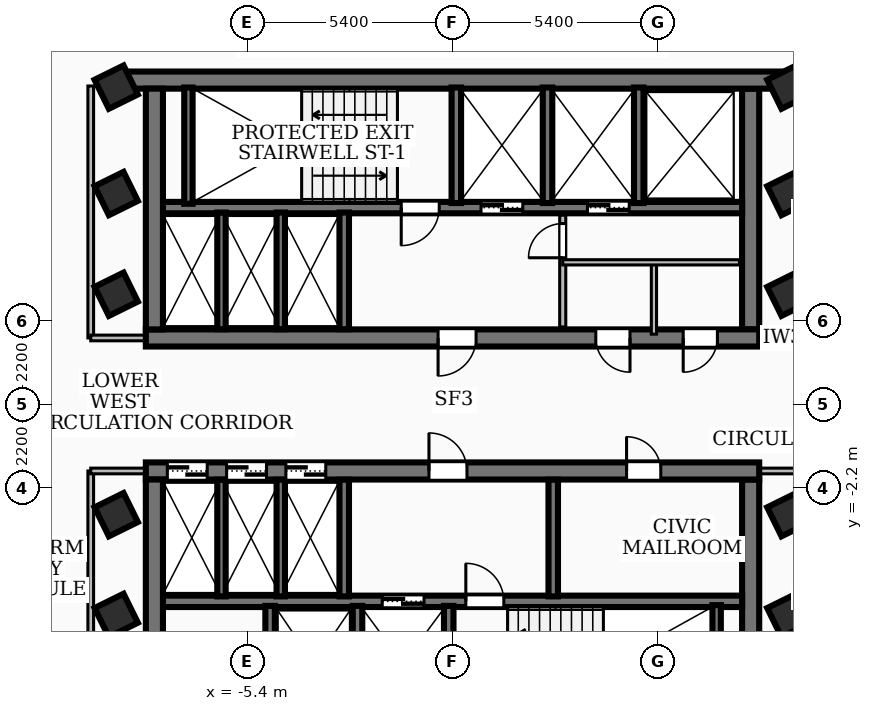
"""IFC4 building model, lengths in metres.
Left out: names, types, materials, properties, quantities, classifications, styles, units other than length and angle.
Written with IfcOpenShell. Run it as: python <this file> out.ifc"""

import sys

from ifc_helpers import new_model, si_unit, direction, frame, frame_2d, origin, origin_2d, place, context, subcontext, project, spatial, rectangle, extrude, element, fill, save


model = new_model("IFC4")
c1 = context("Model", 3, precision=1e-05, world=origin(), true_north=direction((0.0, 1.0)))
c2 = subcontext(c1, "Body", "Model", "MODEL_VIEW")
j1 = project(units=[si_unit("LENGTHUNIT", "METRE"), si_unit("PLANEANGLEUNIT", "RADIAN")], contexts=[c1])
p1 = place(None, origin())
s1 = spatial("IfcSite", under=j1, at=p1, CompositionType="ELEMENT")
p2 = place(p1, origin())
s2 = spatial("IfcBuilding", under=s1, at=p2, CompositionType="ELEMENT")
p3 = place(p2, frame((0.0, 0.0, 192.6)))
s3 = spatial("IfcBuildingStorey", under=s2, at=p3, CompositionType="ELEMENT", Elevation=192.6)
p4 = place(p3, frame((-8.78, 8.535, 0.0), z_axis=(0.0, 0.0, 1.0), x_axis=(1.0, 0.0, 0.0)))
e1 = element("IfcWall", 1, at=p4, inside=s3, PredefinedType="SHEAR", context=c2, shape_type="SweptSolid", body=[
    extrude(rectangle(XDim=17.56, YDim=0.45, at=frame_2d((8.78, 0.0))), origin(), (0.0, 0.0, 1.0), 3.2),
])
p5 = place(p3, frame((8.07, 1.75, 0.0), z_axis=(0.0, 0.0, 1.0), x_axis=(-1.0, 0.0, 0.0)))
e2 = element("IfcWall", 2, at=p5, inside=s3, PredefinedType="SHEAR", context=c2, shape_type="SweptSolid", body=[
    extrude(rectangle(XDim=16.14, YDim=0.45, at=frame_2d((8.07, 0.0))), origin(), (0.0, 0.0, 1.0), 3.2),
])
p6 = place(p5, frame((7.45, 0.0, 0.0)))
e3 = element("IfcOpeningElement", 3, at=p6, cuts=e2, PredefinedType="OPENING", context=c2, shape_type="SweptSolid", body=[
    extrude(rectangle(XDim=1.0, YDim=2.1, at=frame_2d((0.5, 1.05))), frame((0.0, 0.235, 0.0), z_axis=(0.0, -1.0, 0.0), x_axis=(1.0, 0.0, 0.0)), (0.0, 0.0, 1.0), 0.47),
])
p7 = place(p5, frame((3.4, 0.0, 0.0)))
e4 = element("IfcOpeningElement", 4, at=p7, cuts=e2, PredefinedType="OPENING", context=c2, shape_type="SweptSolid", body=[
    extrude(rectangle(XDim=0.9, YDim=2.06, at=frame_2d((0.45, 1.03))), frame((0.0, 0.235, 0.0), z_axis=(0.0, -1.0, 0.0), x_axis=(1.0, 0.0, 0.0)), (0.0, 0.0, 1.0), 0.47),
])
p8 = place(p5, frame((1.1, 0.0, 0.0)))
e5 = element("IfcOpeningElement", 5, at=p8, cuts=e2, PredefinedType="OPENING", context=c2, shape_type="SweptSolid", body=[
    extrude(rectangle(XDim=0.9, YDim=2.06, at=frame_2d((0.45, 1.03))), frame((0.0, 0.235, 0.0), z_axis=(0.0, -1.0, 0.0), x_axis=(1.0, 0.0, 0.0)), (0.0, 0.0, 1.0), 0.47),
])
for number, where, z_axis, x_axis in (
    (6, (-7.845, 1.975, 0.0), (0.0, 0.0, 1.0), (0.0, 1.0, 0.0)),
    (7, (7.845, 8.31, 0.0), (0.0, 0.0, 1.0), (0.0, -1.0, 0.0)),
):
    element("IfcWall", number, at=place(p3, frame(where, z_axis=z_axis, x_axis=x_axis)), inside=s3, PredefinedType="SHEAR", context=c2, shape_type="SweptSolid", body=[
        extrude(rectangle(XDim=6.335, YDim=0.45, at=frame_2d((3.167, 0.0))), origin(), (0.0, 0.0, 1.0), 3.2),
    ])
p9 = place(p3, frame((7.62, 5.18, 0.0), z_axis=(0.0, 0.0, 1.0), x_axis=(-1.0, 0.0, 0.0)))
e8 = element("IfcWall", 8, at=p9, inside=s3, PredefinedType="SOLIDWALL", context=c2, shape_type="SweptSolid", body=[
    extrude(rectangle(XDim=15.24, YDim=0.3, at=frame_2d((7.62, 0.0))), origin(), (0.0, 0.0, 1.0), 3.2),
])
p10 = place(p9, frame((5.77, 0.0, 0.0)))
e9 = element("IfcOpeningElement", 9, at=p10, cuts=e8, PredefinedType="OPENING", context=c2, shape_type="SweptSolid", body=[
    extrude(rectangle(XDim=1.1, YDim=2.15, at=frame_2d((0.55, 1.075))), frame((0.0, 0.16, 0.0), z_axis=(0.0, -1.0, 0.0), x_axis=(1.0, 0.0, 0.0)), (0.0, 0.0, 1.0), 0.32),
])
p11 = place(p9, frame((2.97, 0.0, 0.0)))
e10 = element("IfcOpeningElement", 10, at=p11, cuts=e8, PredefinedType="OPENING", context=c2, shape_type="SweptSolid", body=[
    extrude(rectangle(XDim=1.1, YDim=2.15, at=frame_2d((0.55, 1.075))), frame((0.0, 0.16, 0.0), z_axis=(0.0, -1.0, 0.0), x_axis=(1.0, 0.0, 0.0)), (0.0, 0.0, 1.0), 0.32),
])
p12 = place(p9, frame((7.97, 0.0, 0.0)))
e11 = element("IfcOpeningElement", 11, at=p12, cuts=e8, PredefinedType="OPENING", context=c2, shape_type="SweptSolid", body=[
    extrude(rectangle(XDim=1.0, YDim=2.1, at=frame_2d((0.5, 1.05))), frame((0.0, 0.16, 0.0), z_axis=(0.0, -1.0, 0.0), x_axis=(1.0, 0.0, 0.0)), (0.0, 0.0, 1.0), 0.32),
])
p13 = place(p3, frame((-8.07, -1.75, 0.0), z_axis=(0.0, 0.0, 1.0), x_axis=(1.0, 0.0, 0.0)))
e12 = element("IfcWall", 12, at=p13, inside=s3, PredefinedType="SHEAR", context=c2, shape_type="SweptSolid", body=[
    extrude(rectangle(XDim=16.14, YDim=0.45, at=frame_2d((8.07, 0.0))), origin(), (0.0, 0.0, 1.0), 3.2),
])
p14 = place(p13, frame((7.45, 0.0, 0.0)))
e13 = element("IfcOpeningElement", 13, at=p14, cuts=e12, PredefinedType="OPENING", context=c2, shape_type="SweptSolid", body=[
    extrude(rectangle(XDim=1.0, YDim=2.1, at=frame_2d((0.5, 1.05))), frame((0.0, 0.235, 0.0), z_axis=(0.0, -1.0, 0.0), x_axis=(1.0, 0.0, 0.0)), (0.0, 0.0, 1.0), 0.47),
])
p15 = place(p13, frame((12.65, 0.0, 0.0)))
e14 = element("IfcOpeningElement", 14, at=p15, cuts=e12, PredefinedType="OPENING", context=c2, shape_type="SweptSolid", body=[
    extrude(rectangle(XDim=0.9, YDim=2.06, at=frame_2d((0.45, 1.03))), frame((0.0, 0.235, 0.0), z_axis=(0.0, -1.0, 0.0), x_axis=(1.0, 0.0, 0.0)), (0.0, 0.0, 1.0), 0.47),
])
p16 = place(p13, frame((0.565, 0.0, 0.0)))
e15 = element("IfcOpeningElement", 15, at=p16, cuts=e12, PredefinedType="OPENING", context=c2, shape_type="SweptSolid", body=[
    extrude(rectangle(XDim=1.05, YDim=2.15, at=frame_2d((0.525, 1.075))), frame((0.0, 0.235, 0.0), z_axis=(0.0, -1.0, 0.0), x_axis=(1.0, 0.0, 0.0)), (0.0, 0.0, 1.0), 0.47),
])
p17 = place(p13, frame((2.125, 0.0, 0.0)))
e16 = element("IfcOpeningElement", 16, at=p17, cuts=e12, PredefinedType="OPENING", context=c2, shape_type="SweptSolid", body=[
    extrude(rectangle(XDim=1.05, YDim=2.15, at=frame_2d((0.525, 1.075))), frame((0.0, 0.235, 0.0), z_axis=(0.0, -1.0, 0.0), x_axis=(1.0, 0.0, 0.0)), (0.0, 0.0, 1.0), 0.47),
])
p18 = place(p13, frame((3.685, 0.0, 0.0)))
e17 = element("IfcOpeningElement", 17, at=p18, cuts=e12, PredefinedType="OPENING", context=c2, shape_type="SweptSolid", body=[
    extrude(rectangle(XDim=1.05, YDim=2.15, at=frame_2d((0.525, 1.075))), frame((0.0, 0.235, 0.0), z_axis=(0.0, -1.0, 0.0), x_axis=(1.0, 0.0, 0.0)), (0.0, 0.0, 1.0), 0.47),
])
for number, where, z_axis, x_axis in (
    (18, (-7.845, -8.31, 0.0), (0.0, 0.0, 1.0), (0.0, 1.0, 0.0)),
    (19, (7.845, -1.975, 0.0), (0.0, 0.0, 1.0), (0.0, -1.0, 0.0)),
):
    element("IfcWall", number, at=place(p3, frame(where, z_axis=z_axis, x_axis=x_axis)), inside=s3, PredefinedType="SHEAR", context=c2, shape_type="SweptSolid", body=[
        extrude(rectangle(XDim=6.335, YDim=0.45, at=frame_2d((3.167, 0.0))), origin(), (0.0, 0.0, 1.0), 3.2),
    ])
p19 = place(p3, frame((-7.62, -5.18, 0.0), z_axis=(0.0, 0.0, 1.0), x_axis=(1.0, 0.0, 0.0)))
e20 = element("IfcWall", 20, at=p19, inside=s3, PredefinedType="SOLIDWALL", context=c2, shape_type="SweptSolid", body=[
    extrude(rectangle(XDim=15.24, YDim=0.3, at=frame_2d((7.62, 0.0))), origin(), (0.0, 0.0, 1.0), 3.2),
])
p20 = place(p19, frame((5.77, 0.0, 0.0)))
e21 = element("IfcOpeningElement", 21, at=p20, cuts=e20, PredefinedType="OPENING", context=c2, shape_type="SweptSolid", body=[
    extrude(rectangle(XDim=1.1, YDim=2.15, at=frame_2d((0.55, 1.075))), frame((0.0, 0.16, 0.0), z_axis=(0.0, -1.0, 0.0), x_axis=(1.0, 0.0, 0.0)), (0.0, 0.0, 1.0), 0.32),
])
p21 = place(p19, frame((7.97, 0.0, 0.0)))
e22 = element("IfcOpeningElement", 22, at=p21, cuts=e20, PredefinedType="OPENING", context=c2, shape_type="SweptSolid", body=[
    extrude(rectangle(XDim=1.0, YDim=2.1, at=frame_2d((0.5, 1.05))), frame((0.0, 0.16, 0.0), z_axis=(0.0, -1.0, 0.0), x_axis=(1.0, 0.0, 0.0)), (0.0, 0.0, 1.0), 0.32),
])
for number, where, z_axis, x_axis in (
    (23, (-6.95, 5.28, 0.0), (0.0, 0.0, 1.0), (0.0, 1.0, 0.0)),
    (24, (6.95, -8.34, 0.0), (0.0, 0.0, 1.0), (0.0, 1.0, 0.0)),
):
    element("IfcWall", number, at=place(p3, frame(where, z_axis=z_axis, x_axis=x_axis)), inside=s3, PredefinedType="SOLIDWALL", context=c2, shape_type="SweptSolid", body=[
        extrude(rectangle(XDim=3.06, YDim=0.22, at=frame_2d((1.53, 0.0))), origin(), (0.0, 0.0, 1.0), 3.2),
    ])
for number, where, z_axis, x_axis in (
    (25, (0.1, 5.3, 0.0), (0.0, 0.0, 1.0), (0.0, 1.0, 0.0)),
    (26, (2.5, 5.3, 0.0), (0.0, 0.0, 1.0), (0.0, 1.0, 0.0)),
    (27, (4.9, 5.3, 0.0), (0.0, 0.0, 1.0), (0.0, 1.0, 0.0)),
):
    element("IfcWall", number, at=place(p3, frame(where, z_axis=z_axis, x_axis=x_axis)), inside=s3, PredefinedType="SOLIDWALL", context=c2, shape_type="SweptSolid", body=[
        extrude(rectangle(XDim=3.04, YDim=0.25, at=frame_2d((1.52, 0.0))), origin(), (0.0, 0.0, 1.0), 3.2),
    ])
p22 = place(p3, frame((-2.85, 1.98, 0.0), z_axis=(0.0, 0.0, 1.0), x_axis=(0.0, 1.0, 0.0)))
e28 = element("IfcWall", 28, at=p22, inside=s3, PredefinedType="SOLIDWALL", context=c2, shape_type="SweptSolid", body=[
    extrude(rectangle(XDim=3.07, YDim=0.25, at=frame_2d((1.535, 0.0))), origin(), (0.0, 0.0, 1.0), 3.2),
])
for number, where, z_axis, x_axis in (
    (29, (-0.1, -8.34, 0.0), (0.0, 0.0, 1.0), (0.0, 1.0, 0.0)),
    (30, (-2.5, -8.34, 0.0), (0.0, 0.0, 1.0), (0.0, 1.0, 0.0)),
    (31, (-4.8, -8.34, 0.0), (0.0, 0.0, 1.0), (0.0, 1.0, 0.0)),
):
    element("IfcWall", number, at=place(p3, frame(where, z_axis=z_axis, x_axis=x_axis)), inside=s3, PredefinedType="SOLIDWALL", context=c2, shape_type="SweptSolid", body=[
        extrude(rectangle(XDim=3.04, YDim=0.25, at=frame_2d((1.52, 0.0))), origin(), (0.0, 0.0, 1.0), 3.2),
    ])
for number, where, z_axis, x_axis in (
    (32, (-2.85, -5.05, 0.0), (0.0, 0.0, 1.0), (0.0, 1.0, 0.0)),
    (33, (2.65, -5.05, 0.0), (0.0, 0.0, 1.0), (0.0, 1.0, 0.0)),
):
    element("IfcWall", number, at=place(p3, frame(where, z_axis=z_axis, x_axis=x_axis)), inside=s3, PredefinedType="SOLIDWALL", context=c2, shape_type="SweptSolid", body=[
        extrude(rectangle(XDim=3.07, YDim=0.25, at=frame_2d((1.535, 0.0))), origin(), (0.0, 0.0, 1.0), 3.2),
    ])
for number, where, z_axis, x_axis in (
    (34, (-6.08, 1.98, 0.0), (0.0, 0.0, 1.0), (0.0, 1.0, 0.0)),
    (35, (-4.52, 1.98, 0.0), (0.0, 0.0, 1.0), (0.0, 1.0, 0.0)),
    (36, (-6.08, -5.05, 0.0), (0.0, 0.0, 1.0), (0.0, 1.0, 0.0)),
    (37, (-4.52, -5.05, 0.0), (0.0, 0.0, 1.0), (0.0, 1.0, 0.0)),
):
    element("IfcWall", number, at=place(p3, frame(where, z_axis=z_axis, x_axis=x_axis)), inside=s3, PredefinedType="SOLIDWALL", context=c2, shape_type="SweptSolid", body=[
        extrude(rectangle(XDim=3.07, YDim=0.22, at=frame_2d((1.535, 0.0))), origin(), (0.0, 0.0, 1.0), 3.2),
    ])
for number, where, z_axis, x_axis in (
    (38, (-8.85, -5.55, 0.0), (0.0, 0.0, 1.0), (0.897, 0.442, 0.0)),
    (39, (-8.85, -2.9, 0.0), (0.0, 0.0, 1.0), (0.897, 0.442, 0.0)),
    (40, (-8.85, 2.9, 0.0), (0.0, 0.0, 1.0), (0.897, 0.442, 0.0)),
    (41, (-8.85, 5.55, 0.0), (0.0, 0.0, 1.0), (0.897, 0.442, 0.0)),
    (42, (8.85, -5.55, 0.0), (0.0, 0.0, 1.0), (0.897, 0.442, 0.0)),
    (43, (8.85, -2.9, 0.0), (0.0, 0.0, 1.0), (0.897, 0.442, 0.0)),
    (44, (8.85, 2.9, 0.0), (0.0, 0.0, 1.0), (0.897, 0.442, 0.0)),
    (45, (8.85, 5.55, 0.0), (0.0, 0.0, 1.0), (0.897, 0.442, 0.0)),
    (46, (-8.85, 8.35, 0.0), (0.0, 0.0, 1.0), (0.897, 0.442, 0.0)),
    (47, (8.85, 8.35, 0.0), (0.0, 0.0, 1.0), (0.897, 0.442, 0.0)),
):
    element("IfcColumn", number, at=place(p3, frame(where, z_axis=z_axis, x_axis=x_axis)), inside=s3, PredefinedType="COLUMN", context=c2, shape_type="SweptSolid", body=[
        extrude(rectangle(XDim=0.85, YDim=0.85, at=origin_2d()), origin(), (0.0, 0.0, 1.0), 3.6),
    ])
p23 = place(p3, frame((2.9, 2.04, 0.0), z_axis=(0.0, 0.0, 1.0), x_axis=(0.0, 1.0, 0.0)))
e48 = element("IfcWall", 48, at=p23, inside=s3, PredefinedType="PARTITIONING", context=c2, shape_type="SweptSolid", body=[
    extrude(rectangle(XDim=2.94, YDim=0.16, at=frame_2d((1.47, 0.0))), origin(), (0.0, 0.0, 1.0), 2.43),
])
p24 = place(p23, frame((1.82, 0.0, 0.0)))
e49 = element("IfcOpeningElement", 49, at=p24, cuts=e48, PredefinedType="OPENING", context=c2, shape_type="SweptSolid", body=[
    extrude(rectangle(XDim=0.9, YDim=2.06, at=frame_2d((0.45, 1.03))), frame((0.0, 0.09, 0.0), z_axis=(0.0, -1.0, 0.0), x_axis=(1.0, 0.0, 0.0)), (0.0, 0.0, 1.0), 0.18),
])
p25 = place(p3, frame((2.9, 3.74, 0.0), z_axis=(0.0, 0.0, 1.0), x_axis=(1.0, 0.0, 0.0)))
e50 = element("IfcWall", 50, at=p25, inside=s3, PredefinedType="PARTITIONING", context=c2, shape_type="SweptSolid", body=[
    extrude(rectangle(XDim=4.65, YDim=0.138, at=frame_2d((2.325, 0.0))), origin(), (0.0, 0.0, 1.0), 3.2),
])
p26 = place(p3, frame((5.3, 1.85, 0.0), z_axis=(0.0, 0.0, 1.0), x_axis=(0.0, 1.0, 0.0)))
e51 = element("IfcWall", 51, at=p26, inside=s3, PredefinedType="PARTITIONING", context=c2, shape_type="SweptSolid", body=[
    extrude(rectangle(XDim=1.89, YDim=0.138, at=frame_2d((0.945, 0.0))), origin(), (0.0, 0.0, 1.0), 2.43),
])
p27 = place(p3, frame((-9.52, 1.75, 0.0), z_axis=(0.0, 0.0, 1.0), x_axis=(0.0, 1.0, 0.0)))
e52 = element("IfcWall", 52, at=p27, inside=s3, PredefinedType="PARTITIONING", context=c2, shape_type="SweptSolid", body=[
    extrude(rectangle(XDim=6.63, YDim=0.15, at=frame_2d((3.315, 0.0))), origin(), (0.0, 0.0, 1.0), 3.2),
])
p28 = place(p3, frame((-7.85, 1.75, 0.0), z_axis=(0.0, 0.0, 1.0), x_axis=(-1.0, 0.0, 0.0)))
e53 = element("IfcWall", 53, at=p28, inside=s3, PredefinedType="PARTITIONING", context=c2, shape_type="SweptSolid", body=[
    extrude(rectangle(XDim=1.67, YDim=0.15, at=frame_2d((0.835, 0.0))), origin(), (0.0, 0.0, 1.0), 2.43),
])
p29 = place(p3, frame((-9.52, -8.38, 0.0), z_axis=(0.0, 0.0, 1.0), x_axis=(0.0, 1.0, 0.0)))
e54 = element("IfcWall", 54, at=p29, inside=s3, PredefinedType="PARTITIONING", context=c2, shape_type="SweptSolid", body=[
    extrude(rectangle(XDim=6.63, YDim=0.15, at=frame_2d((3.315, 0.0))), origin(), (0.0, 0.0, 1.0), 2.504),
])
for number, where, z_axis, x_axis in (
    (55, (-7.85, -1.75, 0.0), (0.0, 0.0, 1.0), (-1.0, 0.0, 0.0)),
    (56, (7.85, 1.75, 0.0), (0.0, 0.0, 1.0), (1.0, 0.0, 0.0)),
    (57, (7.85, -1.75, 0.0), (0.0, 0.0, 1.0), (1.0, 0.0, 0.0)),
):
    element("IfcWall", number, at=place(p3, frame(where, z_axis=z_axis, x_axis=x_axis)), inside=s3, PredefinedType="PARTITIONING", context=c2, shape_type="SweptSolid", body=[
        extrude(rectangle(XDim=1.67, YDim=0.15, at=frame_2d((0.835, 0.0))), origin(), (0.0, 0.0, 1.0), 2.43),
    ])
p30 = place(p3, frame((8.122, 15.843, 0.0), z_axis=(0.0, 0.0, 1.0), x_axis=(0.442129285211, -0.896951333774, 0.0)))
e58 = element("IfcWall", 58, at=p30, inside=s3, PredefinedType="PARTITIONING", context=c2, shape_type="SweptSolid", body=[
    extrude(rectangle(XDim=20.639, YDim=0.11, at=frame_2d((10.319, 0.0))), origin(), (0.0, 0.0, 1.0), 2.504),
])
p31 = place(p30, frame((10.02, 0.0, 0.0)))
e59 = element("IfcOpeningElement", 59, at=p31, cuts=e58, PredefinedType="OPENING", context=c2, shape_type="SweptSolid", body=[
    extrude(rectangle(XDim=1.2, YDim=2.1, at=frame_2d((0.6, 1.05))), frame((0.0, 0.065, 0.0), z_axis=(0.0, -1.0, 0.0), x_axis=(1.0, 0.0, 0.0)), (0.0, 0.0, 1.0), 0.13),
])
p32 = place(p3, frame((-15.843, 8.122, 0.0), z_axis=(0.0, 0.0, 1.0), x_axis=(0.896951333774, 0.442129285211, 0.0)))
e60 = element("IfcWall", 60, at=p32, inside=s3, PredefinedType="PARTITIONING", context=c2, shape_type="SweptSolid", body=[
    extrude(rectangle(XDim=20.639, YDim=0.11, at=frame_2d((10.319, 0.0))), origin(), (0.0, 0.0, 1.0), 2.504),
])
p33 = place(p32, frame((10.02, 0.0, 0.0)))
e61 = element("IfcOpeningElement", 61, at=p33, cuts=e60, PredefinedType="OPENING", context=c2, shape_type="SweptSolid", body=[
    extrude(rectangle(XDim=1.2, YDim=2.1, at=frame_2d((0.6, 1.05))), frame((0.0, 0.065, 0.0), z_axis=(0.0, -1.0, 0.0), x_axis=(1.0, 0.0, 0.0)), (0.0, 0.0, 1.0), 0.13),
])
p34 = place(p3, frame((-8.122, -15.843, 0.0), z_axis=(0.0, 0.0, 1.0), x_axis=(-0.442129285211, 0.896951333774, 0.0)))
e62 = element("IfcWall", 62, at=p34, inside=s3, PredefinedType="PARTITIONING", context=c2, shape_type="SweptSolid", body=[
    extrude(rectangle(XDim=20.639, YDim=0.11, at=frame_2d((10.319, 0.0))), origin(), (0.0, 0.0, 1.0), 2.504),
])
p35 = place(p34, frame((10.02, 0.0, 0.0)))
e63 = element("IfcOpeningElement", 63, at=p35, cuts=e62, PredefinedType="OPENING", context=c2, shape_type="SweptSolid", body=[
    extrude(rectangle(XDim=1.2, YDim=2.1, at=frame_2d((0.6, 1.05))), frame((0.0, 0.065, 0.0), z_axis=(0.0, -1.0, 0.0), x_axis=(1.0, 0.0, 0.0)), (0.0, 0.0, 1.0), 0.13),
])
p36 = place(p6, origin())
e64 = element("IfcDoor", 64, at=p36, inside=s3, OperationType="SINGLE_SWING_RIGHT", PredefinedType="DOOR", context=c2, shape_type="SweptSolid", body=[
    extrude(rectangle(XDim=1.0, YDim=2.1, at=frame_2d((0.5, 1.05))), frame((0.0, 0.025, 0.0), z_axis=(0.0, -1.0, 0.0), x_axis=(1.0, 0.0, 0.0)), (0.0, 0.0, 1.0), 0.05),
])
fill(e3, e64)
p37 = place(p14, origin())
e65 = element("IfcDoor", 65, at=p37, inside=s3, OperationType="SINGLE_SWING_LEFT", PredefinedType="DOOR", context=c2, shape_type="SweptSolid", body=[
    extrude(rectangle(XDim=1.0, YDim=2.1, at=frame_2d((0.5, 1.05))), frame((0.0, 0.025, 0.0), z_axis=(0.0, -1.0, 0.0), x_axis=(1.0, 0.0, 0.0)), (0.0, 0.0, 1.0), 0.05),
])
fill(e13, e65)
p38 = place(p10, origin())
e66 = element("IfcDoor", 66, at=p38, inside=s3, OperationType="DOUBLE_DOOR_SLIDING", PredefinedType="DOOR", context=c2, shape_type="SweptSolid", body=[
    extrude(rectangle(XDim=1.1, YDim=2.15, at=frame_2d((0.55, 1.075))), frame((0.0, 0.025, 0.0), z_axis=(0.0, -1.0, 0.0), x_axis=(1.0, 0.0, 0.0)), (0.0, 0.0, 1.0), 0.05),
])
fill(e9, e66)
p39 = place(p11, origin())
e67 = element("IfcDoor", 67, at=p39, inside=s3, OperationType="DOUBLE_DOOR_SLIDING", PredefinedType="DOOR", context=c2, shape_type="SweptSolid", body=[
    extrude(rectangle(XDim=1.1, YDim=2.15, at=frame_2d((0.55, 1.075))), frame((0.0, 0.025, 0.0), z_axis=(0.0, -1.0, 0.0), x_axis=(1.0, 0.0, 0.0)), (0.0, 0.0, 1.0), 0.05),
])
fill(e10, e67)
p40 = place(p12, origin())
e68 = element("IfcDoor", 68, at=p40, inside=s3, OperationType="SINGLE_SWING_RIGHT", PredefinedType="DOOR", context=c2, shape_type="SweptSolid", body=[
    extrude(rectangle(XDim=1.0, YDim=2.1, at=frame_2d((0.5, 1.05))), frame((0.0, 0.025, 0.0), z_axis=(0.0, -1.0, 0.0), x_axis=(1.0, 0.0, 0.0)), (0.0, 0.0, 1.0), 0.05),
])
fill(e11, e68)
p41 = place(p20, origin())
e69 = element("IfcDoor", 69, at=p41, inside=s3, OperationType="DOUBLE_DOOR_SLIDING", PredefinedType="DOOR", context=c2, shape_type="SweptSolid", body=[
    extrude(rectangle(XDim=1.1, YDim=2.15, at=frame_2d((0.55, 1.075))), frame((0.0, 0.025, 0.0), z_axis=(0.0, -1.0, 0.0), x_axis=(1.0, 0.0, 0.0)), (0.0, 0.0, 1.0), 0.05),
])
fill(e21, e69)
p42 = place(p21, origin())
e70 = element("IfcDoor", 70, at=p42, inside=s3, OperationType="SINGLE_SWING_LEFT", PredefinedType="DOOR", context=c2, shape_type="SweptSolid", body=[
    extrude(rectangle(XDim=1.0, YDim=2.1, at=frame_2d((0.5, 1.05))), frame((0.0, 0.025, 0.0), z_axis=(0.0, -1.0, 0.0), x_axis=(1.0, 0.0, 0.0)), (0.0, 0.0, 1.0), 0.05),
])
fill(e22, e70)
p43 = place(p15, origin())
e71 = element("IfcDoor", 71, at=p43, inside=s3, OperationType="SINGLE_SWING_LEFT", PredefinedType="DOOR", context=c2, shape_type="SweptSolid", body=[
    extrude(rectangle(XDim=0.9, YDim=2.06, at=frame_2d((0.45, 1.03))), frame((0.0, 0.025, 0.0), z_axis=(0.0, -1.0, 0.0), x_axis=(1.0, 0.0, 0.0)), (0.0, 0.0, 1.0), 0.05),
])
fill(e14, e71)
p44 = place(p16, origin())
e72 = element("IfcDoor", 72, at=p44, inside=s3, OperationType="DOUBLE_DOOR_SLIDING", PredefinedType="DOOR", context=c2, shape_type="SweptSolid", body=[
    extrude(rectangle(XDim=1.05, YDim=2.15, at=frame_2d((0.525, 1.075))), frame((0.0, 0.025, 0.0), z_axis=(0.0, -1.0, 0.0), x_axis=(1.0, 0.0, 0.0)), (0.0, 0.0, 1.0), 0.05),
])
fill(e15, e72)
p45 = place(p17, origin())
e73 = element("IfcDoor", 73, at=p45, inside=s3, OperationType="DOUBLE_DOOR_SLIDING", PredefinedType="DOOR", context=c2, shape_type="SweptSolid", body=[
    extrude(rectangle(XDim=1.05, YDim=2.15, at=frame_2d((0.525, 1.075))), frame((0.0, 0.025, 0.0), z_axis=(0.0, -1.0, 0.0), x_axis=(1.0, 0.0, 0.0)), (0.0, 0.0, 1.0), 0.05),
])
fill(e16, e73)
p46 = place(p18, origin())
e74 = element("IfcDoor", 74, at=p46, inside=s3, OperationType="DOUBLE_DOOR_SLIDING", PredefinedType="DOOR", context=c2, shape_type="SweptSolid", body=[
    extrude(rectangle(XDim=1.05, YDim=2.15, at=frame_2d((0.525, 1.075))), frame((0.0, 0.025, 0.0), z_axis=(0.0, -1.0, 0.0), x_axis=(1.0, 0.0, 0.0)), (0.0, 0.0, 1.0), 0.05),
])
fill(e17, e74)
p47 = place(p7, origin())
e75 = element("IfcDoor", 75, at=p47, inside=s3, OperationType="SINGLE_SWING_LEFT", PredefinedType="DOOR", context=c2, shape_type="SweptSolid", body=[
    extrude(rectangle(XDim=0.9, YDim=2.06, at=frame_2d((0.45, 1.03))), frame((0.0, 0.025, 0.0), z_axis=(0.0, -1.0, 0.0), x_axis=(1.0, 0.0, 0.0)), (0.0, 0.0, 1.0), 0.05),
])
fill(e4, e75)
p48 = place(p8, origin())
e76 = element("IfcDoor", 76, at=p48, inside=s3, OperationType="SINGLE_SWING_RIGHT", PredefinedType="DOOR", context=c2, shape_type="SweptSolid", body=[
    extrude(rectangle(XDim=0.9, YDim=2.06, at=frame_2d((0.45, 1.03))), frame((0.0, 0.025, 0.0), z_axis=(0.0, -1.0, 0.0), x_axis=(1.0, 0.0, 0.0)), (0.0, 0.0, 1.0), 0.05),
])
fill(e5, e76)
p49 = place(p24, origin())
e77 = element("IfcDoor", 77, at=p49, inside=s3, OperationType="SINGLE_SWING_LEFT", PredefinedType="DOOR", context=c2, shape_type="SweptSolid", body=[
    extrude(rectangle(XDim=0.9, YDim=2.06, at=frame_2d((0.45, 1.03))), frame((0.0, 0.025, 0.0), z_axis=(0.0, -1.0, 0.0), x_axis=(1.0, 0.0, 0.0)), (0.0, 0.0, 1.0), 0.05),
])
fill(e49, e77)
save(model, sys.argv[1])
